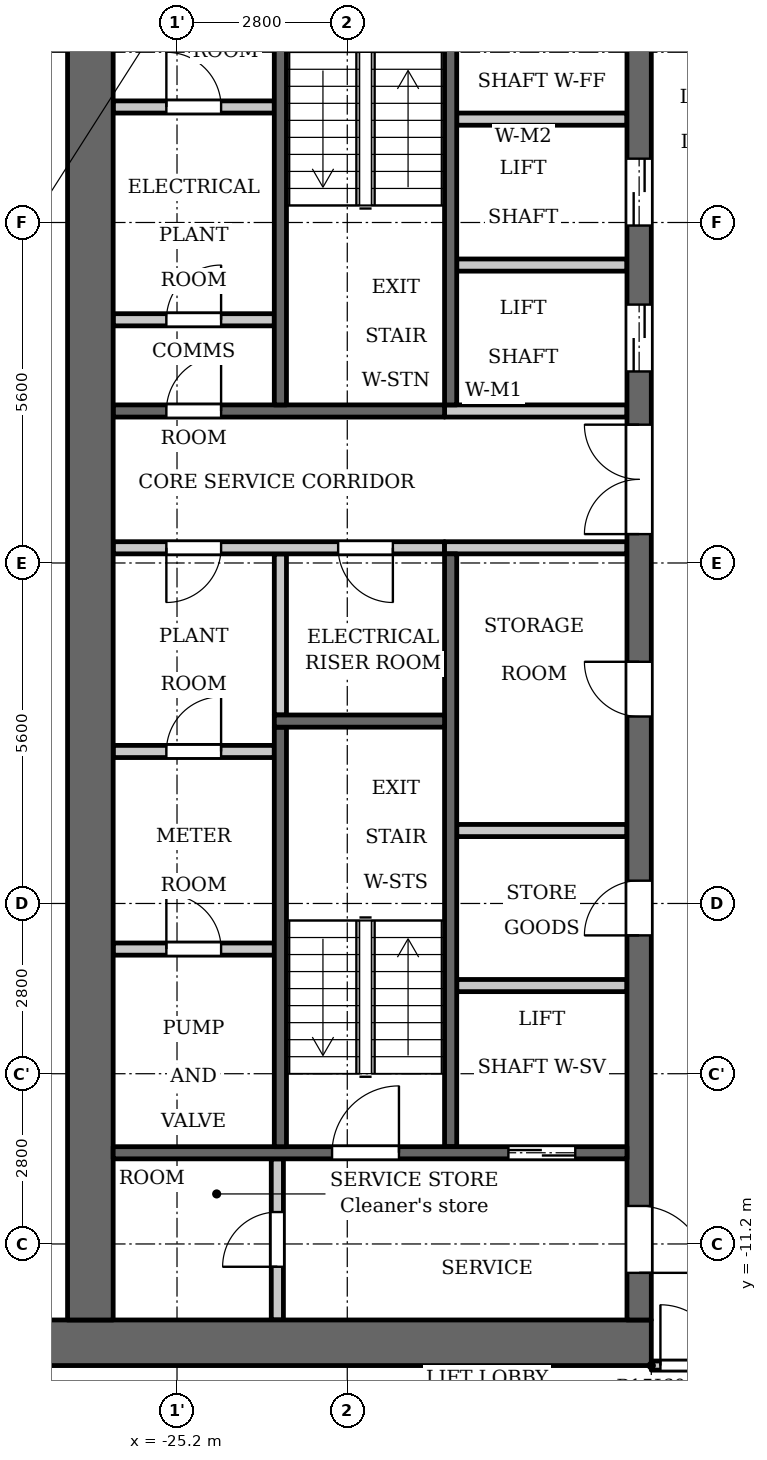
"""IFC4 building model, lengths in metres.
Left out: names, types, materials, properties, quantities, classifications, styles, units other than length and angle.
Written with IfcOpenShell. Run it as: python <this file> out.ifc"""

import sys

from ifc_helpers import new_model, si_unit, direction, frame, frame_2d, origin, place, context, subcontext, project, spatial, rectangle, extrude, element, fill, save


model = new_model("IFC4")
c1 = context("Model", 3, precision=1e-05, world=origin(), true_north=direction((0.0, 1.0)))
c2 = subcontext(c1, "Body", "Model", "MODEL_VIEW")
j1 = project(units=[si_unit("LENGTHUNIT", "METRE"), si_unit("PLANEANGLEUNIT", "RADIAN")], contexts=[c1])
p1 = place(None, origin())
s1 = spatial("IfcSite", under=j1, at=p1, CompositionType="ELEMENT")
p2 = place(p1, origin())
s2 = spatial("IfcBuilding", under=s1, at=p2, CompositionType="ELEMENT")
p3 = place(p2, frame((0.0, 0.0, 153.6)))
s3 = spatial("IfcBuildingStorey", under=s2, at=p3, CompositionType="ELEMENT", Elevation=153.6)
p4 = place(p3, frame((-23.5, -2.5, 0.0), z_axis=(0.0, 0.0, 1.0), x_axis=(0.0, 1.0, 0.0)))
e1 = element("IfcWall", 1, at=p4, inside=s3, PredefinedType="PARTITIONING", context=c2, shape_type="SweptSolid", body=[
    extrude(rectangle(XDim=2.65, YDim=0.2, at=frame_2d((1.325, 0.0))), origin(), (0.0, 0.0, 1.0), 3.2),
])
p5 = place(p3, frame((-20.7, 2.6, 0.0), z_axis=(0.0, 0.0, 1.0), x_axis=(0.0, 1.0, 0.0)))
e2 = element("IfcWall", 2, at=p5, inside=s3, PredefinedType="SHEAR", context=c2, shape_type="SweptSolid", body=[
    extrude(rectangle(XDim=7.0, YDim=0.2, at=frame_2d((3.5, 0.0))), origin(), (0.0, 0.0, 1.0), 3.2),
])
p6 = place(p3, frame((-20.7, -9.6, 0.0), z_axis=(0.0, 0.0, 1.0), x_axis=(0.0, 1.0, 0.0)))
e3 = element("IfcWall", 3, at=p6, inside=s3, PredefinedType="SHEAR", context=c2, shape_type="SweptSolid", body=[
    extrude(rectangle(XDim=9.75, YDim=0.2, at=frame_2d((4.875, 0.0))), origin(), (0.0, 0.0, 1.0), 3.2),
])
p7 = place(p3, frame((-20.8, 2.5, 0.0), z_axis=(0.0, 0.0, 1.0), x_axis=(-1.0, 0.0, 0.0)))
e4 = element("IfcWall", 4, at=p7, inside=s3, PredefinedType="SHEAR", context=c2, shape_type="SweptSolid", body=[
    extrude(rectangle(XDim=5.45, YDim=0.2, at=frame_2d((2.725, 0.0))), origin(), (0.0, 0.0, 1.0), 3.2),
])
p8 = place(p7, frame((3.675, 0.0, 0.0)))
e5 = element("IfcOpeningElement", 5, at=p8, cuts=e4, PredefinedType="OPENING", context=c2, shape_type="SweptSolid", body=[
    extrude(rectangle(XDim=0.9, YDim=2.1, at=frame_2d((0.45, 1.05))), frame((0.0, 0.11, 0.0), z_axis=(0.0, -1.0, 0.0), x_axis=(1.0, 0.0, 0.0)), (0.0, 0.0, 1.0), 0.22),
])
p9 = place(p3, frame((-20.8, 0.25, 0.0), z_axis=(0.0, 0.0, 1.0), x_axis=(-1.0, 0.0, 0.0)))
e6 = element("IfcWall", 6, at=p9, inside=s3, PredefinedType="PARTITIONING", context=c2, shape_type="SweptSolid", body=[
    extrude(rectangle(XDim=5.45, YDim=0.2, at=frame_2d((2.725, 0.0))), origin(), (0.0, 0.0, 1.0), 3.2),
])
p10 = place(p9, frame((0.85, 0.0, 0.0)))
e7 = element("IfcOpeningElement", 7, at=p10, cuts=e6, PredefinedType="OPENING", context=c2, shape_type="SweptSolid", body=[
    extrude(rectangle(XDim=0.9, YDim=2.1, at=frame_2d((0.45, 1.05))), frame((0.0, 0.11, 0.0), z_axis=(0.0, -1.0, 0.0), x_axis=(1.0, 0.0, 0.0)), (0.0, 0.0, 1.0), 0.22),
])
p11 = place(p9, frame((3.675, 0.0, 0.0)))
e8 = element("IfcOpeningElement", 8, at=p11, cuts=e6, PredefinedType="OPENING", context=c2, shape_type="SweptSolid", body=[
    extrude(rectangle(XDim=0.9, YDim=2.1, at=frame_2d((0.45, 1.05))), frame((0.0, 0.11, 0.0), z_axis=(0.0, -1.0, 0.0), x_axis=(1.0, 0.0, 0.0)), (0.0, 0.0, 1.0), 0.22),
])
p12 = place(p3, frame((-17.4, -12.825, 0.0), z_axis=(0.0, 0.0, 1.0), x_axis=(-1.0, 0.0, 0.0)))
e9 = element("IfcWall", 9, at=p12, inside=s3, PredefinedType="SHEAR", context=c2, shape_type="SweptSolid", body=[
    extrude(rectangle(XDim=10.4, YDim=0.75, at=frame_2d((5.2, 0.0))), origin(), (0.0, 0.0, 1.0), 3.2),
])
p13 = place(p3, frame((-17.8, -4.4, 0.0), z_axis=(0.0, 0.0, 1.0), x_axis=(-1.0, 0.0, 0.0)))
e10 = element("IfcWall", 10, at=p13, inside=s3, PredefinedType="PARTITIONING", context=c2, shape_type="SweptSolid", body=[
    extrude(rectangle(XDim=2.8, YDim=0.2, at=frame_2d((1.4, 0.0))), origin(), (0.0, 0.0, 1.0), 3.2),
])
p14 = place(p3, frame((-17.6, -12.45, 0.0), z_axis=(0.0, 0.0, 1.0), x_axis=(0.0, 1.0, 0.0)))
e11 = element("IfcWall", 11, at=p14, inside=s3, PredefinedType="SHEAR", context=c2, shape_type="SweptSolid", body=[
    extrude(rectangle(XDim=24.9, YDim=0.4, at=frame_2d((12.45, 0.0))), origin(), (0.0, 0.0, 1.0), 3.2),
])
p15 = place(p14, frame((6.325, 0.0, 0.0)))
e12 = element("IfcOpeningElement", 12, at=p15, cuts=e11, PredefinedType="OPENING", context=c2, shape_type="SweptSolid", body=[
    extrude(rectangle(XDim=0.9, YDim=2.1, at=frame_2d((0.45, 1.05))), frame((0.0, 0.21, 0.0), z_axis=(0.0, -1.0, 0.0), x_axis=(1.0, 0.0, 0.0)), (0.0, 0.0, 1.0), 0.42),
])
p16 = place(p14, frame((9.925, 0.0, 0.0)))
e13 = element("IfcOpeningElement", 13, at=p16, cuts=e11, PredefinedType="OPENING", context=c2, shape_type="SweptSolid", body=[
    extrude(rectangle(XDim=0.9, YDim=2.1, at=frame_2d((0.45, 1.05))), frame((0.0, 0.21, 0.0), z_axis=(0.0, -1.0, 0.0), x_axis=(1.0, 0.0, 0.0)), (0.0, 0.0, 1.0), 0.42),
])
p17 = place(p14, frame((15.6, 0.0, 0.0)))
e14 = element("IfcOpeningElement", 14, at=p17, cuts=e11, PredefinedType="OPENING", context=c2, shape_type="SweptSolid", body=[
    extrude(rectangle(XDim=1.1, YDim=2.1, at=frame_2d((0.55, 1.05))), frame((0.0, 0.21, 0.0), z_axis=(0.0, -1.0, 0.0), x_axis=(1.0, 0.0, 0.0)), (0.0, 0.0, 1.0), 0.42),
])
p18 = place(p14, frame((18.0, 0.0, 0.0)))
e15 = element("IfcOpeningElement", 15, at=p18, cuts=e11, PredefinedType="OPENING", context=c2, shape_type="SweptSolid", body=[
    extrude(rectangle(XDim=1.1, YDim=2.1, at=frame_2d((0.55, 1.05))), frame((0.0, 0.21, 0.0), z_axis=(0.0, -1.0, 0.0), x_axis=(1.0, 0.0, 0.0)), (0.0, 0.0, 1.0), 0.42),
])
p19 = place(p14, frame((23.025, 0.0, 0.0)))
e16 = element("IfcOpeningElement", 16, at=p19, cuts=e11, PredefinedType="OPENING", context=c2, shape_type="SweptSolid", body=[
    extrude(rectangle(XDim=1.1, YDim=2.1, at=frame_2d((0.55, 1.05))), frame((0.0, 0.21, 0.0), z_axis=(0.0, -1.0, 0.0), x_axis=(1.0, 0.0, 0.0)), (0.0, 0.0, 1.0), 0.42),
])
p20 = place(p14, frame((0.775, 0.0, 0.0)))
e17 = element("IfcOpeningElement", 17, at=p20, cuts=e11, PredefinedType="OPENING", context=c2, shape_type="SweptSolid", body=[
    extrude(rectangle(XDim=1.1, YDim=2.1, at=frame_2d((0.55, 1.05))), frame((0.0, 0.21, 0.0), z_axis=(0.0, -1.0, 0.0), x_axis=(1.0, 0.0, 0.0)), (0.0, 0.0, 1.0), 0.42),
])
p21 = place(p14, frame((12.925, 0.0, 0.0)))
e18 = element("IfcOpeningElement", 18, at=p21, cuts=e11, PredefinedType="OPENING", context=c2, shape_type="SweptSolid", body=[
    extrude(rectangle(XDim=1.8, YDim=2.1, at=frame_2d((0.9, 1.05))), frame((0.0, 0.21, 0.0), z_axis=(0.0, -1.0, 0.0), x_axis=(1.0, 0.0, 0.0)), (0.0, 0.0, 1.0), 0.42),
])
p22 = place(p3, frame((-26.625, -12.45, 0.0), z_axis=(0.0, 0.0, 1.0), x_axis=(0.0, 1.0, 0.0)))
e19 = element("IfcWall", 19, at=p22, inside=s3, PredefinedType="SHEAR", context=c2, shape_type="SweptSolid", body=[
    extrude(rectangle(XDim=24.9, YDim=0.75, at=frame_2d((12.45, 0.0))), origin(), (0.0, 0.0, 1.0), 3.2),
])
p23 = place(p3, frame((-23.55, -12.45, 0.0), z_axis=(0.0, 0.0, 1.0), x_axis=(0.0, 1.0, 0.0)))
e20 = element("IfcWall", 20, at=p23, inside=s3, PredefinedType="PARTITIONING", context=c2, shape_type="SweptSolid", body=[
    extrude(rectangle(XDim=2.65, YDim=0.2, at=frame_2d((1.325, 0.0))), origin(), (0.0, 0.0, 1.0), 3.2),
])
p24 = place(p23, frame((0.875, 0.0, 0.0)))
e21 = element("IfcOpeningElement", 21, at=p24, cuts=e20, PredefinedType="OPENING", context=c2, shape_type="SweptSolid", body=[
    extrude(rectangle(XDim=0.9, YDim=2.1, at=frame_2d((0.45, 1.05))), frame((0.0, 0.11, 0.0), z_axis=(0.0, -1.0, 0.0), x_axis=(1.0, 0.0, 0.0)), (0.0, 0.0, 1.0), 0.22),
])
p25 = place(p3, frame((-23.6, -6.35, 0.0), z_axis=(0.0, 0.0, 1.0), x_axis=(-1.0, 0.0, 0.0)))
e22 = element("IfcWall", 22, at=p25, inside=s3, PredefinedType="PARTITIONING", context=c2, shape_type="SweptSolid", body=[
    extrude(rectangle(XDim=2.65, YDim=0.2, at=frame_2d((1.325, 0.0))), origin(), (0.0, 0.0, 1.0), 3.2),
])
p26 = place(p25, frame((0.875, 0.0, 0.0)))
e23 = element("IfcOpeningElement", 23, at=p26, cuts=e22, PredefinedType="OPENING", context=c2, shape_type="SweptSolid", body=[
    extrude(rectangle(XDim=0.9, YDim=2.1, at=frame_2d((0.45, 1.05))), frame((0.0, 0.11, 0.0), z_axis=(0.0, -1.0, 0.0), x_axis=(1.0, 0.0, 0.0)), (0.0, 0.0, 1.0), 0.22),
])
p27 = place(p3, frame((-23.6, -3.1, 0.0), z_axis=(0.0, 0.0, 1.0), x_axis=(-1.0, 0.0, 0.0)))
e24 = element("IfcWall", 24, at=p27, inside=s3, PredefinedType="PARTITIONING", context=c2, shape_type="SweptSolid", body=[
    extrude(rectangle(XDim=2.65, YDim=0.2, at=frame_2d((1.325, 0.0))), origin(), (0.0, 0.0, 1.0), 3.2),
])
p28 = place(p27, frame((0.875, 0.0, 0.0)))
e25 = element("IfcOpeningElement", 25, at=p28, cuts=e24, PredefinedType="OPENING", context=c2, shape_type="SweptSolid", body=[
    extrude(rectangle(XDim=0.9, YDim=2.1, at=frame_2d((0.45, 1.05))), frame((0.0, 0.11, 0.0), z_axis=(0.0, -1.0, 0.0), x_axis=(1.0, 0.0, 0.0)), (0.0, 0.0, 1.0), 0.22),
])
p29 = place(p3, frame((-23.6, 4.0, 0.0), z_axis=(0.0, 0.0, 1.0), x_axis=(-1.0, 0.0, 0.0)))
e26 = element("IfcWall", 26, at=p29, inside=s3, PredefinedType="PARTITIONING", context=c2, shape_type="SweptSolid", body=[
    extrude(rectangle(XDim=2.65, YDim=0.2, at=frame_2d((1.325, 0.0))), origin(), (0.0, 0.0, 1.0), 3.2),
])
p30 = place(p29, frame((0.875, 0.0, 0.0)))
e27 = element("IfcOpeningElement", 27, at=p30, cuts=e26, PredefinedType="OPENING", context=c2, shape_type="SweptSolid", body=[
    extrude(rectangle(XDim=0.9, YDim=2.1, at=frame_2d((0.45, 1.05))), frame((0.0, 0.11, 0.0), z_axis=(0.0, -1.0, 0.0), x_axis=(1.0, 0.0, 0.0)), (0.0, 0.0, 1.0), 0.22),
])
p31 = place(p3, frame((-23.6, 7.5, 0.0), z_axis=(0.0, 0.0, 1.0), x_axis=(-1.0, 0.0, 0.0)))
e28 = element("IfcWall", 28, at=p31, inside=s3, PredefinedType="PARTITIONING", context=c2, shape_type="SweptSolid", body=[
    extrude(rectangle(XDim=2.65, YDim=0.2, at=frame_2d((1.325, 0.0))), origin(), (0.0, 0.0, 1.0), 3.2),
])
p32 = place(p31, frame((0.875, 0.0, 0.0)))
e29 = element("IfcOpeningElement", 29, at=p32, cuts=e28, PredefinedType="OPENING", context=c2, shape_type="SweptSolid", body=[
    extrude(rectangle(XDim=0.9, YDim=2.1, at=frame_2d((0.45, 1.05))), frame((0.0, 0.11, 0.0), z_axis=(0.0, -1.0, 0.0), x_axis=(1.0, 0.0, 0.0)), (0.0, 0.0, 1.0), 0.22),
])
p33 = place(p3, frame((-17.8, -9.7, 0.0), z_axis=(0.0, 0.0, 1.0), x_axis=(-1.0, 0.0, 0.0)))
e30 = element("IfcWall", 30, at=p33, inside=s3, PredefinedType="SHEAR", context=c2, shape_type="SweptSolid", body=[
    extrude(rectangle(XDim=8.45, YDim=0.2, at=frame_2d((4.225, 0.0))), origin(), (0.0, 0.0, 1.0), 3.2),
])
p34 = place(p33, frame((0.85, 0.0, 0.0)))
e31 = element("IfcOpeningElement", 31, at=p34, cuts=e30, PredefinedType="OPENING", context=c2, shape_type="SweptSolid", body=[
    extrude(rectangle(XDim=1.1, YDim=2.1, at=frame_2d((0.55, 1.05))), frame((0.0, 0.11, 0.0), z_axis=(0.0, -1.0, 0.0), x_axis=(1.0, 0.0, 0.0)), (0.0, 0.0, 1.0), 0.22),
])
p35 = place(p33, frame((3.75, 0.0, 0.0)))
e32 = element("IfcOpeningElement", 32, at=p35, cuts=e30, PredefinedType="OPENING", context=c2, shape_type="SweptSolid", body=[
    extrude(rectangle(XDim=1.1, YDim=2.1, at=frame_2d((0.55, 1.05))), frame((0.0, 0.11, 0.0), z_axis=(0.0, -1.0, 0.0), x_axis=(1.0, 0.0, 0.0)), (0.0, 0.0, 1.0), 0.22),
])
p36 = place(p3, frame((-17.8, -6.95, 0.0), z_axis=(0.0, 0.0, 1.0), x_axis=(-1.0, 0.0, 0.0)))
e33 = element("IfcWall", 33, at=p36, inside=s3, PredefinedType="PARTITIONING", context=c2, shape_type="SweptSolid", body=[
    extrude(rectangle(XDim=2.8, YDim=0.2, at=frame_2d((1.4, 0.0))), origin(), (0.0, 0.0, 1.0), 3.2),
])
for number, where, z_axis, x_axis in (
    (34, (-17.8, 0.25, 0.0), (0.0, 0.0, 1.0), (-1.0, 0.0, 0.0)),
    (35, (-17.8, 2.5, 0.0), (0.0, 0.0, 1.0), (-1.0, 0.0, 0.0)),
):
    element("IfcWall", number, at=place(p3, frame(where, z_axis=z_axis, x_axis=x_axis)), inside=s3, PredefinedType="PARTITIONING", context=c2, shape_type="SweptSolid", body=[
        extrude(rectangle(XDim=3.0, YDim=0.2, at=frame_2d((1.5, 0.0))), origin(), (0.0, 0.0, 1.0), 3.2),
    ])
for number, where, z_axis, x_axis in (
    (36, (-17.8, 4.9, 0.0), (0.0, 0.0, 1.0), (-1.0, 0.0, 0.0)),
    (37, (-17.8, 7.3, 0.0), (0.0, 0.0, 1.0), (-1.0, 0.0, 0.0)),
):
    element("IfcWall", number, at=place(p3, frame(where, z_axis=z_axis, x_axis=x_axis)), inside=s3, PredefinedType="PARTITIONING", context=c2, shape_type="SweptSolid", body=[
        extrude(rectangle(XDim=2.8, YDim=0.2, at=frame_2d((1.4, 0.0))), origin(), (0.0, 0.0, 1.0), 3.2),
    ])
p37 = place(p3, frame((-23.5, 2.6, 0.0), z_axis=(0.0, 0.0, 1.0), x_axis=(0.0, 1.0, 0.0)))
e38 = element("IfcWall", 38, at=p37, inside=s3, PredefinedType="SHEAR", context=c2, shape_type="SweptSolid", body=[
    extrude(rectangle(XDim=7.0, YDim=0.2, at=frame_2d((3.5, 0.0))), origin(), (0.0, 0.0, 1.0), 3.2),
])
p38 = place(p3, frame((-23.5, -9.6, 0.0), z_axis=(0.0, 0.0, 1.0), x_axis=(0.0, 1.0, 0.0)))
e39 = element("IfcWall", 39, at=p38, inside=s3, PredefinedType="SHEAR", context=c2, shape_type="SweptSolid", body=[
    extrude(rectangle(XDim=6.9, YDim=0.2, at=frame_2d((3.45, 0.0))), origin(), (0.0, 0.0, 1.0), 3.2),
])
p39 = place(p3, frame((-20.8, -2.6, 0.0), z_axis=(0.0, 0.0, 1.0), x_axis=(-1.0, 0.0, 0.0)))
e40 = element("IfcWall", 40, at=p39, inside=s3, PredefinedType="SHEAR", context=c2, shape_type="SweptSolid", body=[
    extrude(rectangle(XDim=2.8, YDim=0.2, at=frame_2d((1.4, 0.0))), origin(), (0.0, 0.0, 1.0), 3.2),
])
p40 = place(p3, frame((-17.4, -13.2, 0.0), z_axis=(0.0, 0.0, 1.0), x_axis=(1.0, 0.0, 0.0)))
e41 = element("IfcWall", 41, at=p40, inside=s3, PredefinedType="PARTITIONING", context=c2, shape_type="SweptSolid", body=[
    extrude(rectangle(XDim=34.8, YDim=0.15, at=frame_2d((17.4, 0.0))), origin(), (0.0, 0.0, 1.0), 3.2),
])
p41 = place(p40, frame((0.15, 0.0, 0.0)))
e42 = element("IfcOpeningElement", 42, at=p41, cuts=e41, PredefinedType="OPENING", context=c2, shape_type="SweptSolid", body=[
    extrude(rectangle(XDim=1.0, YDim=2.1, at=frame_2d((0.5, 1.05))), frame((0.0, 0.085, 0.0), z_axis=(0.0, -1.0, 0.0), x_axis=(1.0, 0.0, 0.0)), (0.0, 0.0, 1.0), 0.17),
])
p42 = place(p40, frame((33.55, 0.0, 0.0)))
e43 = element("IfcOpeningElement", 43, at=p42, cuts=e41, PredefinedType="OPENING", context=c2, shape_type="SweptSolid", body=[
    extrude(rectangle(XDim=1.0, YDim=2.1, at=frame_2d((0.5, 1.05))), frame((0.0, 0.085, 0.0), z_axis=(0.0, -1.0, 0.0), x_axis=(1.0, 0.0, 0.0)), (0.0, 0.0, 1.0), 0.17),
])
p43 = place(p40, frame((15.7, 0.0, 0.0)))
e44 = element("IfcOpeningElement", 44, at=p43, cuts=e41, PredefinedType="OPENING", context=c2, shape_type="SweptSolid", body=[
    extrude(rectangle(XDim=1.0, YDim=2.1, at=frame_2d((0.5, 1.05))), frame((0.0, 0.085, 0.0), z_axis=(0.0, -1.0, 0.0), x_axis=(1.0, 0.0, 0.0)), (0.0, 0.0, 1.0), 0.17),
])
p44 = place(p34, origin())
e45 = element("IfcDoor", 45, at=p44, inside=s3, OperationType="DOUBLE_DOOR_SLIDING", PredefinedType="DOOR", context=c2, shape_type="SweptSolid", body=[
    extrude(rectangle(XDim=1.1, YDim=2.1, at=frame_2d((0.55, 1.05))), frame((0.0, 0.025, 0.0), z_axis=(0.0, -1.0, 0.0), x_axis=(1.0, 0.0, 0.0)), (0.0, 0.0, 1.0), 0.05),
])
fill(e31, e45)
p45 = place(p15, origin())
e46 = element("IfcDoor", 46, at=p45, inside=s3, OperationType="SINGLE_SWING_RIGHT", PredefinedType="DOOR", context=c2, shape_type="SweptSolid", body=[
    extrude(rectangle(XDim=0.9, YDim=2.1, at=frame_2d((0.45, 1.05))), frame((0.0, 0.025, 0.0), z_axis=(0.0, -1.0, 0.0), x_axis=(1.0, 0.0, 0.0)), (0.0, 0.0, 1.0), 0.05),
])
fill(e12, e46)
p46 = place(p16, origin())
e47 = element("IfcDoor", 47, at=p46, inside=s3, OperationType="SINGLE_SWING_LEFT", PredefinedType="DOOR", context=c2, shape_type="SweptSolid", body=[
    extrude(rectangle(XDim=0.9, YDim=2.1, at=frame_2d((0.45, 1.05))), frame((0.0, 0.025, 0.0), z_axis=(0.0, -1.0, 0.0), x_axis=(1.0, 0.0, 0.0)), (0.0, 0.0, 1.0), 0.05),
])
fill(e13, e47)
p47 = place(p17, origin())
e48 = element("IfcDoor", 48, at=p47, inside=s3, OperationType="DOUBLE_DOOR_SLIDING", PredefinedType="DOOR", context=c2, shape_type="SweptSolid", body=[
    extrude(rectangle(XDim=1.1, YDim=2.1, at=frame_2d((0.55, 1.05))), frame((0.0, 0.025, 0.0), z_axis=(0.0, -1.0, 0.0), x_axis=(1.0, 0.0, 0.0)), (0.0, 0.0, 1.0), 0.05),
])
fill(e14, e48)
p48 = place(p18, origin())
e49 = element("IfcDoor", 49, at=p48, inside=s3, OperationType="DOUBLE_DOOR_SLIDING", PredefinedType="DOOR", context=c2, shape_type="SweptSolid", body=[
    extrude(rectangle(XDim=1.1, YDim=2.1, at=frame_2d((0.55, 1.05))), frame((0.0, 0.025, 0.0), z_axis=(0.0, -1.0, 0.0), x_axis=(1.0, 0.0, 0.0)), (0.0, 0.0, 1.0), 0.05),
])
fill(e15, e49)
p49 = place(p20, origin())
e50 = element("IfcDoor", 50, at=p49, inside=s3, OperationType="SINGLE_SWING_LEFT", PredefinedType="DOOR", context=c2, shape_type="SweptSolid", body=[
    extrude(rectangle(XDim=1.1, YDim=2.1, at=frame_2d((0.55, 1.05))), frame((0.0, 0.025, 0.0), z_axis=(0.0, -1.0, 0.0), x_axis=(1.0, 0.0, 0.0)), (0.0, 0.0, 1.0), 0.05),
])
fill(e17, e50)
p50 = place(p24, origin())
e51 = element("IfcDoor", 51, at=p50, inside=s3, OperationType="SINGLE_SWING_RIGHT", PredefinedType="DOOR", context=c2, shape_type="SweptSolid", body=[
    extrude(rectangle(XDim=0.9, YDim=2.1, at=frame_2d((0.45, 1.05))), frame((0.0, 0.025, 0.0), z_axis=(0.0, -1.0, 0.0), x_axis=(1.0, 0.0, 0.0)), (0.0, 0.0, 1.0), 0.05),
])
fill(e21, e51)
p51 = place(p35, origin())
e52 = element("IfcDoor", 52, at=p51, inside=s3, OperationType="SINGLE_SWING_LEFT", PredefinedType="DOOR", context=c2, shape_type="SweptSolid", body=[
    extrude(rectangle(XDim=1.1, YDim=2.1, at=frame_2d((0.55, 1.05))), frame((0.0, 0.025, 0.0), z_axis=(0.0, -1.0, 0.0), x_axis=(1.0, 0.0, 0.0)), (0.0, 0.0, 1.0), 0.05),
])
fill(e32, e52)
p52 = place(p21, origin())
e53 = element("IfcDoor", 53, at=p52, inside=s3, OperationType="DOUBLE_DOOR_SINGLE_SWING", PredefinedType="DOOR", context=c2, shape_type="SweptSolid", body=[
    extrude(rectangle(XDim=1.8, YDim=2.1, at=frame_2d((0.9, 1.05))), frame((0.0, 0.025, 0.0), z_axis=(0.0, -1.0, 0.0), x_axis=(1.0, 0.0, 0.0)), (0.0, 0.0, 1.0), 0.05),
])
fill(e18, e53)
p53 = place(p10, origin())
e54 = element("IfcDoor", 54, at=p53, inside=s3, OperationType="SINGLE_SWING_RIGHT", PredefinedType="DOOR", context=c2, shape_type="SweptSolid", body=[
    extrude(rectangle(XDim=0.9, YDim=2.1, at=frame_2d((0.45, 1.05))), frame((0.0, 0.025, 0.0), z_axis=(0.0, -1.0, 0.0), x_axis=(1.0, 0.0, 0.0)), (0.0, 0.0, 1.0), 0.05),
])
fill(e7, e54)
p54 = place(p26, origin())
e55 = element("IfcDoor", 55, at=p54, inside=s3, OperationType="SINGLE_SWING_RIGHT", PredefinedType="DOOR", context=c2, shape_type="SweptSolid", body=[
    extrude(rectangle(XDim=0.9, YDim=2.1, at=frame_2d((0.45, 1.05))), frame((0.0, 0.025, 0.0), z_axis=(0.0, -1.0, 0.0), x_axis=(1.0, 0.0, 0.0)), (0.0, 0.0, 1.0), 0.05),
])
fill(e23, e55)
p55 = place(p28, origin())
e56 = element("IfcDoor", 56, at=p55, inside=s3, OperationType="SINGLE_SWING_LEFT", PredefinedType="DOOR", context=c2, shape_type="SweptSolid", body=[
    extrude(rectangle(XDim=0.9, YDim=2.1, at=frame_2d((0.45, 1.05))), frame((0.0, 0.025, 0.0), z_axis=(0.0, -1.0, 0.0), x_axis=(1.0, 0.0, 0.0)), (0.0, 0.0, 1.0), 0.05),
])
fill(e25, e56)
p56 = place(p11, origin())
e57 = element("IfcDoor", 57, at=p56, inside=s3, OperationType="SINGLE_SWING_LEFT", PredefinedType="DOOR", context=c2, shape_type="SweptSolid", body=[
    extrude(rectangle(XDim=0.9, YDim=2.1, at=frame_2d((0.45, 1.05))), frame((0.0, 0.025, 0.0), z_axis=(0.0, -1.0, 0.0), x_axis=(1.0, 0.0, 0.0)), (0.0, 0.0, 1.0), 0.05),
])
fill(e8, e57)
p57 = place(p30, origin())
e58 = element("IfcDoor", 58, at=p57, inside=s3, OperationType="SINGLE_SWING_LEFT", PredefinedType="DOOR", context=c2, shape_type="SweptSolid", body=[
    extrude(rectangle(XDim=0.9, YDim=2.1, at=frame_2d((0.45, 1.05))), frame((0.0, 0.025, 0.0), z_axis=(0.0, -1.0, 0.0), x_axis=(1.0, 0.0, 0.0)), (0.0, 0.0, 1.0), 0.05),
])
fill(e27, e58)
p58 = place(p32, origin())
e59 = element("IfcDoor", 59, at=p58, inside=s3, OperationType="SINGLE_SWING_RIGHT", PredefinedType="DOOR", context=c2, shape_type="SweptSolid", body=[
    extrude(rectangle(XDim=0.9, YDim=2.1, at=frame_2d((0.45, 1.05))), frame((0.0, 0.025, 0.0), z_axis=(0.0, -1.0, 0.0), x_axis=(1.0, 0.0, 0.0)), (0.0, 0.0, 1.0), 0.05),
])
fill(e29, e59)
p59 = place(p8, origin())
e60 = element("IfcDoor", 60, at=p59, inside=s3, OperationType="SINGLE_SWING_LEFT", PredefinedType="DOOR", context=c2, shape_type="SweptSolid", body=[
    extrude(rectangle(XDim=0.9, YDim=2.1, at=frame_2d((0.45, 1.05))), frame((0.0, 0.025, 0.0), z_axis=(0.0, -1.0, 0.0), x_axis=(1.0, 0.0, 0.0)), (0.0, 0.0, 1.0), 0.05),
])
fill(e5, e60)
p60 = place(p41, origin())
e61 = element("IfcDoor", 61, at=p60, inside=s3, OperationType="SINGLE_SWING_RIGHT", PredefinedType="DOOR", context=c2, shape_type="SweptSolid", body=[
    extrude(rectangle(XDim=1.0, YDim=2.1, at=frame_2d((0.5, 1.05))), frame((0.0, 0.025, 0.0), z_axis=(0.0, -1.0, 0.0), x_axis=(1.0, 0.0, 0.0)), (0.0, 0.0, 1.0), 0.05),
])
fill(e42, e61)
save(model, sys.argv[1])
